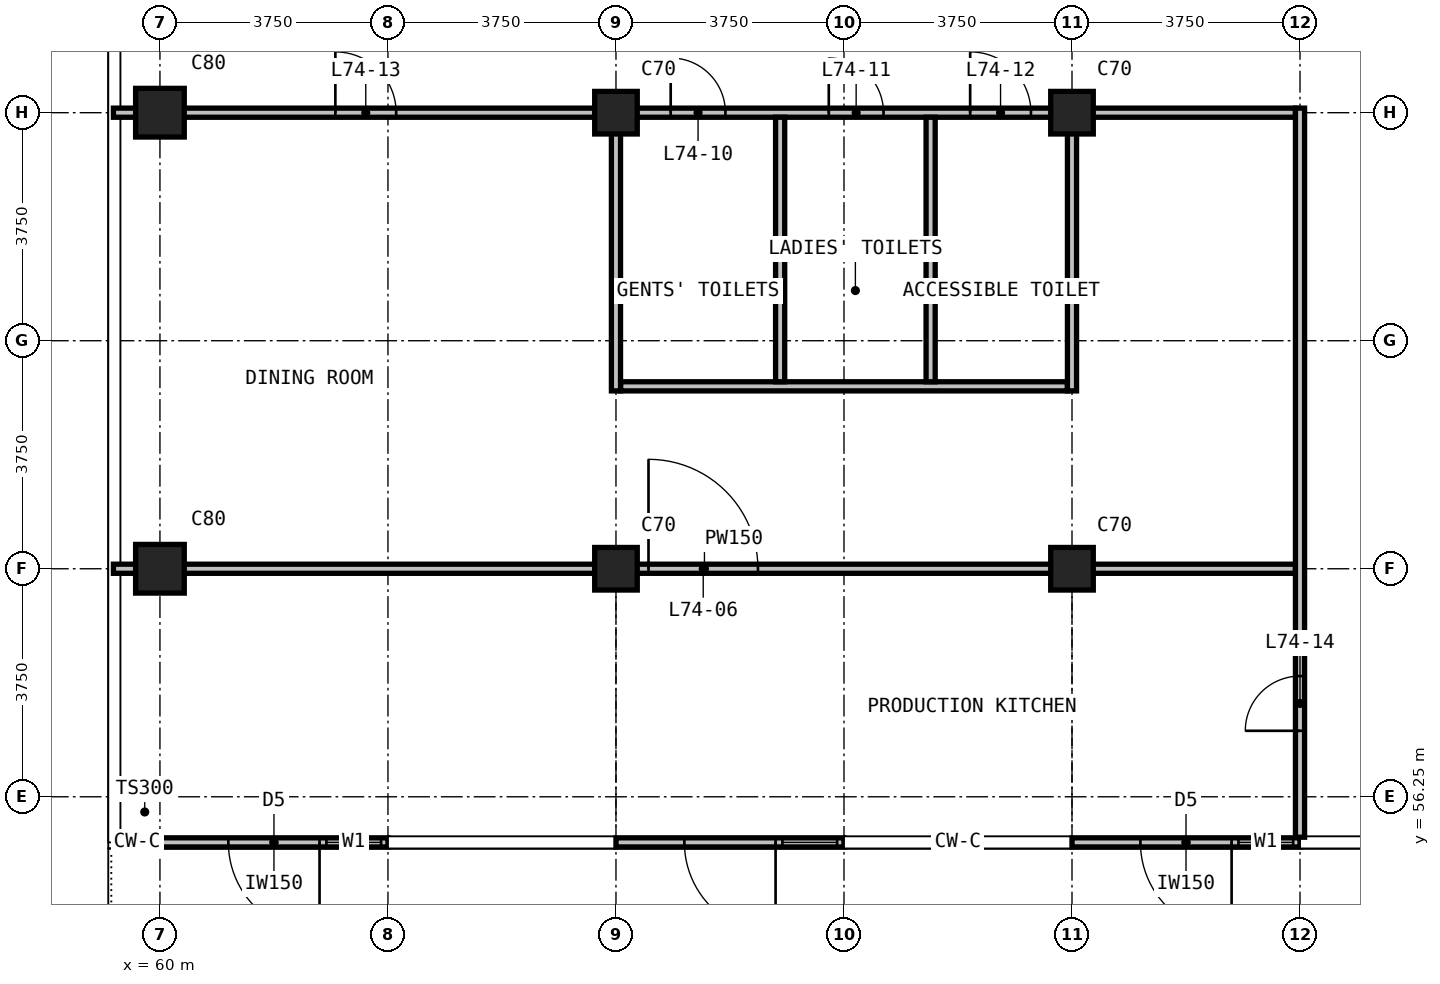
"""IFC4 building model, lengths in metres.
Left out: names, types, materials, properties, quantities, classifications, styles, units other than length and angle.
Written with IfcOpenShell. Run it as: python <this file> out.ifc"""

import sys

from ifc_helpers import new_model, si_unit, direction, frame, frame_2d, origin, origin_2d, place, context, subcontext, project, spatial, rectangle, extrude, element, fill, save


model = new_model("IFC4")
c1 = context("Model", 3, precision=1e-05, world=origin(), true_north=direction((0.0, 1.0)))
c2 = subcontext(c1, "Body", "Model", "MODEL_VIEW")
j1 = project(units=[si_unit("LENGTHUNIT", "METRE"), si_unit("PLANEANGLEUNIT", "RADIAN")], contexts=[c1])
p1 = place(None, origin())
s1 = spatial("IfcSite", under=j1, at=p1, CompositionType="ELEMENT")
p2 = place(p1, origin())
s2 = spatial("IfcBuilding", under=s1, at=p2, CompositionType="ELEMENT")
p3 = place(p2, frame((0.0, 0.0, 283.7)))
s3 = spatial("IfcBuildingStorey", under=s2, at=p3, CompositionType="ELEMENT", Elevation=283.7)
for number, where, z_axis, x_axis in (
    (1, (60.0, 60.0, 0.0), (0.0, 0.0, 1.0), (1.0, 0.0, 0.0)),
    (2, (60.0, 67.5, 0.0), (0.0, 0.0, 1.0), (1.0, 0.0, 0.0)),
):
    element("IfcColumn", number, at=place(p3, frame(where, z_axis=z_axis, x_axis=x_axis)), inside=s3, PredefinedType="COLUMN", context=c2, shape_type="SweptSolid", body=[
        extrude(rectangle(XDim=0.8, YDim=0.8, at=origin_2d()), origin(), (0.0, 0.0, 1.0), 4.0),
    ])
for number, where, z_axis, x_axis in (
    (3, (67.5, 60.0, 0.0), (0.0, 0.0, 1.0), (1.0, 0.0, 0.0)),
    (4, (67.5, 67.5, 0.0), (0.0, 0.0, 1.0), (1.0, 0.0, 0.0)),
    (5, (75.0, 60.0, 0.0), (0.0, 0.0, 1.0), (1.0, 0.0, 0.0)),
    (6, (75.0, 67.5, 0.0), (0.0, 0.0, 1.0), (1.0, 0.0, 0.0)),
):
    element("IfcColumn", number, at=place(p3, frame(where, z_axis=z_axis, x_axis=x_axis)), inside=s3, PredefinedType="COLUMN", context=c2, shape_type="SweptSolid", body=[
        extrude(rectangle(XDim=0.7, YDim=0.7, at=origin_2d()), origin(), (0.0, 0.0, 1.0), 4.0),
    ])
p4 = place(p3, frame((63.75, 55.5, 0.0), z_axis=(0.0, 0.0, 1.0), x_axis=(-1.0, 0.0, 0.0)))
e7 = element("IfcWall", 7, at=p4, inside=s3, PredefinedType="SOLIDWALL", context=c2, shape_type="SweptSolid", body=[
    extrude(rectangle(XDim=3.75, YDim=0.15, at=frame_2d((1.875, 0.0))), origin(), (0.0, 0.0, 1.0), 3.65),
])
p5 = place(p4, frame((0.113, 0.0, 0.1)))
e8 = element("IfcOpeningElement", 8, at=p5, cuts=e7, PredefinedType="OPENING", context=c2, shape_type="SweptSolid", body=[
    extrude(rectangle(XDim=0.9, YDim=2.4, at=frame_2d((0.45, 1.2))), frame((0.0, 0.085, 0.0), z_axis=(0.0, -1.0, 0.0), x_axis=(1.0, 0.0, 0.0)), (0.0, 0.0, 1.0), 0.17),
])
p6 = place(p4, frame((1.125, 0.0, 0.0)))
e9 = element("IfcOpeningElement", 9, at=p6, cuts=e7, PredefinedType="OPENING", context=c2, shape_type="SweptSolid", body=[
    extrude(rectangle(XDim=1.5, YDim=2.4, at=frame_2d((0.75, 1.2))), frame((0.0, 0.085, 0.0), z_axis=(0.0, -1.0, 0.0), x_axis=(1.0, 0.0, 0.0)), (0.0, 0.0, 1.0), 0.17),
])
p7 = place(p3, frame((71.25, 55.5, 0.0), z_axis=(0.0, 0.0, 1.0), x_axis=(-1.0, 0.0, 0.0)))
e10 = element("IfcWall", 10, at=p7, inside=s3, PredefinedType="SOLIDWALL", context=c2, shape_type="SweptSolid", body=[
    extrude(rectangle(XDim=3.75, YDim=0.15, at=frame_2d((1.875, 0.0))), origin(), (0.0, 0.0, 1.0), 3.65),
])
p8 = place(p7, frame((0.113, 0.0, 0.1)))
e11 = element("IfcOpeningElement", 11, at=p8, cuts=e10, PredefinedType="OPENING", context=c2, shape_type="SweptSolid", body=[
    extrude(rectangle(XDim=0.9, YDim=2.4, at=frame_2d((0.45, 1.2))), frame((0.0, 0.085, 0.0), z_axis=(0.0, -1.0, 0.0), x_axis=(1.0, 0.0, 0.0)), (0.0, 0.0, 1.0), 0.17),
])
p9 = place(p7, frame((1.125, 0.0, 0.0)))
e12 = element("IfcOpeningElement", 12, at=p9, cuts=e10, PredefinedType="OPENING", context=c2, shape_type="SweptSolid", body=[
    extrude(rectangle(XDim=1.5, YDim=2.4, at=frame_2d((0.75, 1.2))), frame((0.0, 0.085, 0.0), z_axis=(0.0, -1.0, 0.0), x_axis=(1.0, 0.0, 0.0)), (0.0, 0.0, 1.0), 0.17),
])
p10 = place(p3, frame((78.75, 55.5, 0.0), z_axis=(0.0, 0.0, 1.0), x_axis=(-1.0, 0.0, 0.0)))
e13 = element("IfcWall", 13, at=p10, inside=s3, PredefinedType="SOLIDWALL", context=c2, shape_type="SweptSolid", body=[
    extrude(rectangle(XDim=3.75, YDim=0.15, at=frame_2d((1.875, 0.0))), origin(), (0.0, 0.0, 1.0), 3.65),
])
p11 = place(p10, frame((0.113, 0.0, 0.1)))
e14 = element("IfcOpeningElement", 14, at=p11, cuts=e13, PredefinedType="OPENING", context=c2, shape_type="SweptSolid", body=[
    extrude(rectangle(XDim=0.9, YDim=2.4, at=frame_2d((0.45, 1.2))), frame((0.0, 0.085, 0.0), z_axis=(0.0, -1.0, 0.0), x_axis=(1.0, 0.0, 0.0)), (0.0, 0.0, 1.0), 0.17),
])
p12 = place(p10, frame((1.125, 0.0, 0.0)))
e15 = element("IfcOpeningElement", 15, at=p12, cuts=e13, PredefinedType="OPENING", context=c2, shape_type="SweptSolid", body=[
    extrude(rectangle(XDim=1.5, YDim=2.4, at=frame_2d((0.75, 1.2))), frame((0.0, 0.085, 0.0), z_axis=(0.0, -1.0, 0.0), x_axis=(1.0, 0.0, 0.0)), (0.0, 0.0, 1.0), 0.17),
])
p13 = place(p3, frame((59.235, 60.0, 0.0), z_axis=(0.0, 0.0, 1.0), x_axis=(1.0, 0.0, 0.0)))
e16 = element("IfcWall", 16, at=p13, inside=s3, PredefinedType="PARTITIONING", context=c2, shape_type="SweptSolid", body=[
    extrude(rectangle(XDim=19.44, YDim=0.15, at=frame_2d((9.72, 0.0))), origin(), (0.0, 0.0, 1.0), 3.65),
])
p14 = place(p13, frame((8.8, 0.0, 0.0)))
e17 = element("IfcOpeningElement", 17, at=p14, cuts=e16, PredefinedType="OPENING", context=c2, shape_type="SweptSolid", body=[
    extrude(rectangle(XDim=1.8, YDim=2.2, at=frame_2d((0.9, 1.1))), frame((0.0, 0.085, 0.0), z_axis=(0.0, -1.0, 0.0), x_axis=(1.0, 0.0, 0.0)), (0.0, 0.0, 1.0), 0.17),
])
p15 = place(p3, frame((67.575, 63.0, 0.0), z_axis=(0.0, 0.0, 1.0), x_axis=(1.0, 0.0, 0.0)))
e18 = element("IfcWall", 18, at=p15, inside=s3, PredefinedType="PARTITIONING", context=c2, shape_type="SweptSolid", body=[
    extrude(rectangle(XDim=7.35, YDim=0.15, at=frame_2d((3.675, 0.0))), origin(), (0.0, 0.0, 1.0), 3.65),
])
p16 = place(p3, frame((59.235, 67.5, 0.0), z_axis=(0.0, 0.0, 1.0), x_axis=(1.0, 0.0, 0.0)))
e19 = element("IfcWall", 19, at=p16, inside=s3, PredefinedType="PARTITIONING", context=c2, shape_type="SweptSolid", body=[
    extrude(rectangle(XDim=19.44, YDim=0.15, at=frame_2d((9.72, 0.0))), origin(), (0.0, 0.0, 1.0), 3.65),
])
p17 = place(p16, frame((9.165, 0.0, 0.0)))
e20 = element("IfcOpeningElement", 20, at=p17, cuts=e19, PredefinedType="OPENING", context=c2, shape_type="SweptSolid", body=[
    extrude(rectangle(XDim=0.9, YDim=2.2, at=frame_2d((0.45, 1.1))), frame((0.0, 0.085, 0.0), z_axis=(0.0, -1.0, 0.0), x_axis=(1.0, 0.0, 0.0)), (0.0, 0.0, 1.0), 0.17),
])
p18 = place(p16, frame((11.765, 0.0, 0.0)))
e21 = element("IfcOpeningElement", 21, at=p18, cuts=e19, PredefinedType="OPENING", context=c2, shape_type="SweptSolid", body=[
    extrude(rectangle(XDim=0.9, YDim=2.2, at=frame_2d((0.45, 1.1))), frame((0.0, 0.085, 0.0), z_axis=(0.0, -1.0, 0.0), x_axis=(1.0, 0.0, 0.0)), (0.0, 0.0, 1.0), 0.17),
])
p19 = place(p16, frame((14.09, 0.0, 0.0)))
e22 = element("IfcOpeningElement", 22, at=p19, cuts=e19, PredefinedType="OPENING", context=c2, shape_type="SweptSolid", body=[
    extrude(rectangle(XDim=1.0, YDim=2.2, at=frame_2d((0.5, 1.1))), frame((0.0, 0.085, 0.0), z_axis=(0.0, -1.0, 0.0), x_axis=(1.0, 0.0, 0.0)), (0.0, 0.0, 1.0), 0.17),
])
p20 = place(p16, frame((3.65, 0.0, 0.0)))
e23 = element("IfcOpeningElement", 23, at=p20, cuts=e19, PredefinedType="OPENING", context=c2, shape_type="SweptSolid", body=[
    extrude(rectangle(XDim=1.0, YDim=2.2, at=frame_2d((0.5, 1.1))), frame((0.0, 0.085, 0.0), z_axis=(0.0, -1.0, 0.0), x_axis=(1.0, 0.0, 0.0)), (0.0, 0.0, 1.0), 0.17),
])
p21 = place(p3, frame((67.5, 62.925, 0.0), z_axis=(0.0, 0.0, 1.0), x_axis=(0.0, 1.0, 0.0)))
e24 = element("IfcWall", 24, at=p21, inside=s3, PredefinedType="PARTITIONING", context=c2, shape_type="SweptSolid", body=[
    extrude(rectangle(XDim=4.5, YDim=0.15, at=frame_2d((2.25, 0.0))), origin(), (0.0, 0.0, 1.0), 3.65),
])
for number, where, z_axis, x_axis in (
    (25, (70.2, 63.075, 0.0), (0.0, 0.0, 1.0), (0.0, 1.0, 0.0)),
    (26, (72.675, 63.075, 0.0), (0.0, 0.0, 1.0), (0.0, 1.0, 0.0)),
):
    element("IfcWall", number, at=place(p3, frame(where, z_axis=z_axis, x_axis=x_axis)), inside=s3, PredefinedType="PARTITIONING", context=c2, shape_type="SweptSolid", body=[
        extrude(rectangle(XDim=4.35, YDim=0.15, at=frame_2d((2.175, 0.0))), origin(), (0.0, 0.0, 1.0), 3.65),
    ])
p22 = place(p3, frame((75.0, 62.925, 0.0), z_axis=(0.0, 0.0, 1.0), x_axis=(0.0, 1.0, 0.0)))
e27 = element("IfcWall", 27, at=p22, inside=s3, PredefinedType="PARTITIONING", context=c2, shape_type="SweptSolid", body=[
    extrude(rectangle(XDim=4.5, YDim=0.15, at=frame_2d((2.25, 0.0))), origin(), (0.0, 0.0, 1.0), 3.65),
])
p23 = place(p3, frame((78.75, 55.585, 0.0), z_axis=(0.0, 0.0, 1.0), x_axis=(0.0, 1.0, 0.0)))
e28 = element("IfcWall", 28, at=p23, inside=s3, PredefinedType="PARTITIONING", context=c2, shape_type="SweptSolid", body=[
    extrude(rectangle(XDim=11.99, YDim=0.15, at=frame_2d((5.995, 0.0))), origin(), (0.0, 0.0, 1.0), 3.65),
])
p24 = place(p23, frame((1.75, 0.0, 0.0)))
e29 = element("IfcOpeningElement", 29, at=p24, cuts=e28, PredefinedType="OPENING", context=c2, shape_type="SweptSolid", body=[
    extrude(rectangle(XDim=0.9, YDim=2.2, at=frame_2d((0.45, 1.1))), frame((0.0, 0.085, 0.0), z_axis=(0.0, -1.0, 0.0), x_axis=(1.0, 0.0, 0.0)), (0.0, 0.0, 1.0), 0.17),
])
p25 = place(p5, origin())
e30 = element("IfcWindow", 30, at=p25, inside=s3, PartitioningType="SINGLE_PANEL", PredefinedType="WINDOW", context=c2, shape_type="SweptSolid", body=[
    extrude(rectangle(XDim=0.9, YDim=2.4, at=frame_2d((0.45, 1.2))), frame((0.0, 0.03, 0.0), z_axis=(0.0, -1.0, 0.0), x_axis=(1.0, 0.0, 0.0)), (0.0, 0.0, 1.0), 0.06),
])
fill(e8, e30)
p26 = place(p6, origin())
e31 = element("IfcDoor", 31, at=p26, inside=s3, OperationType="DOUBLE_DOOR_SINGLE_SWING", PredefinedType="DOOR", context=c2, shape_type="SweptSolid", body=[
    extrude(rectangle(XDim=1.5, YDim=2.4, at=frame_2d((0.75, 1.2))), frame((0.0, 0.025, 0.0), z_axis=(0.0, -1.0, 0.0), x_axis=(1.0, 0.0, 0.0)), (0.0, 0.0, 1.0), 0.05),
])
fill(e9, e31)
p27 = place(p8, origin())
e32 = element("IfcWindow", 32, at=p27, inside=s3, PartitioningType="SINGLE_PANEL", PredefinedType="WINDOW", context=c2, shape_type="SweptSolid", body=[
    extrude(rectangle(XDim=0.9, YDim=2.4, at=frame_2d((0.45, 1.2))), frame((0.0, 0.03, 0.0), z_axis=(0.0, -1.0, 0.0), x_axis=(1.0, 0.0, 0.0)), (0.0, 0.0, 1.0), 0.06),
])
fill(e11, e32)
p28 = place(p9, origin())
e33 = element("IfcDoor", 33, at=p28, inside=s3, OperationType="DOUBLE_DOOR_SINGLE_SWING", PredefinedType="DOOR", context=c2, shape_type="SweptSolid", body=[
    extrude(rectangle(XDim=1.5, YDim=2.4, at=frame_2d((0.75, 1.2))), frame((0.0, 0.025, 0.0), z_axis=(0.0, -1.0, 0.0), x_axis=(1.0, 0.0, 0.0)), (0.0, 0.0, 1.0), 0.05),
])
fill(e12, e33)
p29 = place(p11, origin())
e34 = element("IfcWindow", 34, at=p29, inside=s3, PartitioningType="SINGLE_PANEL", PredefinedType="WINDOW", context=c2, shape_type="SweptSolid", body=[
    extrude(rectangle(XDim=0.9, YDim=2.4, at=frame_2d((0.45, 1.2))), frame((0.0, 0.03, 0.0), z_axis=(0.0, -1.0, 0.0), x_axis=(1.0, 0.0, 0.0)), (0.0, 0.0, 1.0), 0.06),
])
fill(e14, e34)
p30 = place(p12, origin())
e35 = element("IfcDoor", 35, at=p30, inside=s3, OperationType="DOUBLE_DOOR_SINGLE_SWING", PredefinedType="DOOR", context=c2, shape_type="SweptSolid", body=[
    extrude(rectangle(XDim=1.5, YDim=2.4, at=frame_2d((0.75, 1.2))), frame((0.0, 0.025, 0.0), z_axis=(0.0, -1.0, 0.0), x_axis=(1.0, 0.0, 0.0)), (0.0, 0.0, 1.0), 0.05),
])
fill(e15, e35)
p31 = place(p14, origin())
e36 = element("IfcDoor", 36, at=p31, inside=s3, OperationType="DOUBLE_DOOR_SINGLE_SWING", PredefinedType="DOOR", context=c2, shape_type="SweptSolid", body=[
    extrude(rectangle(XDim=1.8, YDim=2.2, at=frame_2d((0.9, 1.1))), frame((0.0, 0.025, 0.0), z_axis=(0.0, -1.0, 0.0), x_axis=(1.0, 0.0, 0.0)), (0.0, 0.0, 1.0), 0.05),
])
fill(e17, e36)
p32 = place(p17, origin())
e37 = element("IfcDoor", 37, at=p32, inside=s3, OperationType="SINGLE_SWING_LEFT", PredefinedType="DOOR", context=c2, shape_type="SweptSolid", body=[
    extrude(rectangle(XDim=0.9, YDim=2.2, at=frame_2d((0.45, 1.1))), frame((0.0, 0.025, 0.0), z_axis=(0.0, -1.0, 0.0), x_axis=(1.0, 0.0, 0.0)), (0.0, 0.0, 1.0), 0.05),
])
fill(e20, e37)
p33 = place(p18, origin())
e38 = element("IfcDoor", 38, at=p33, inside=s3, OperationType="SINGLE_SWING_LEFT", PredefinedType="DOOR", context=c2, shape_type="SweptSolid", body=[
    extrude(rectangle(XDim=0.9, YDim=2.2, at=frame_2d((0.45, 1.1))), frame((0.0, 0.025, 0.0), z_axis=(0.0, -1.0, 0.0), x_axis=(1.0, 0.0, 0.0)), (0.0, 0.0, 1.0), 0.05),
])
fill(e21, e38)
p34 = place(p19, origin())
e39 = element("IfcDoor", 39, at=p34, inside=s3, OperationType="SINGLE_SWING_LEFT", PredefinedType="DOOR", context=c2, shape_type="SweptSolid", body=[
    extrude(rectangle(XDim=1.0, YDim=2.2, at=frame_2d((0.5, 1.1))), frame((0.0, 0.025, 0.0), z_axis=(0.0, -1.0, 0.0), x_axis=(1.0, 0.0, 0.0)), (0.0, 0.0, 1.0), 0.05),
])
fill(e22, e39)
p35 = place(p20, origin())
e40 = element("IfcDoor", 40, at=p35, inside=s3, OperationType="SINGLE_SWING_LEFT", PredefinedType="DOOR", context=c2, shape_type="SweptSolid", body=[
    extrude(rectangle(XDim=1.0, YDim=2.2, at=frame_2d((0.5, 1.1))), frame((0.0, 0.025, 0.0), z_axis=(0.0, -1.0, 0.0), x_axis=(1.0, 0.0, 0.0)), (0.0, 0.0, 1.0), 0.05),
])
fill(e23, e40)
p36 = place(p24, origin())
e41 = element("IfcDoor", 41, at=p36, inside=s3, OperationType="SINGLE_SWING_RIGHT", PredefinedType="DOOR", context=c2, shape_type="SweptSolid", body=[
    extrude(rectangle(XDim=0.9, YDim=2.2, at=frame_2d((0.45, 1.1))), frame((0.0, 0.025, 0.0), z_axis=(0.0, -1.0, 0.0), x_axis=(1.0, 0.0, 0.0)), (0.0, 0.0, 1.0), 0.05),
])
fill(e29, e41)
save(model, sys.argv[1])
